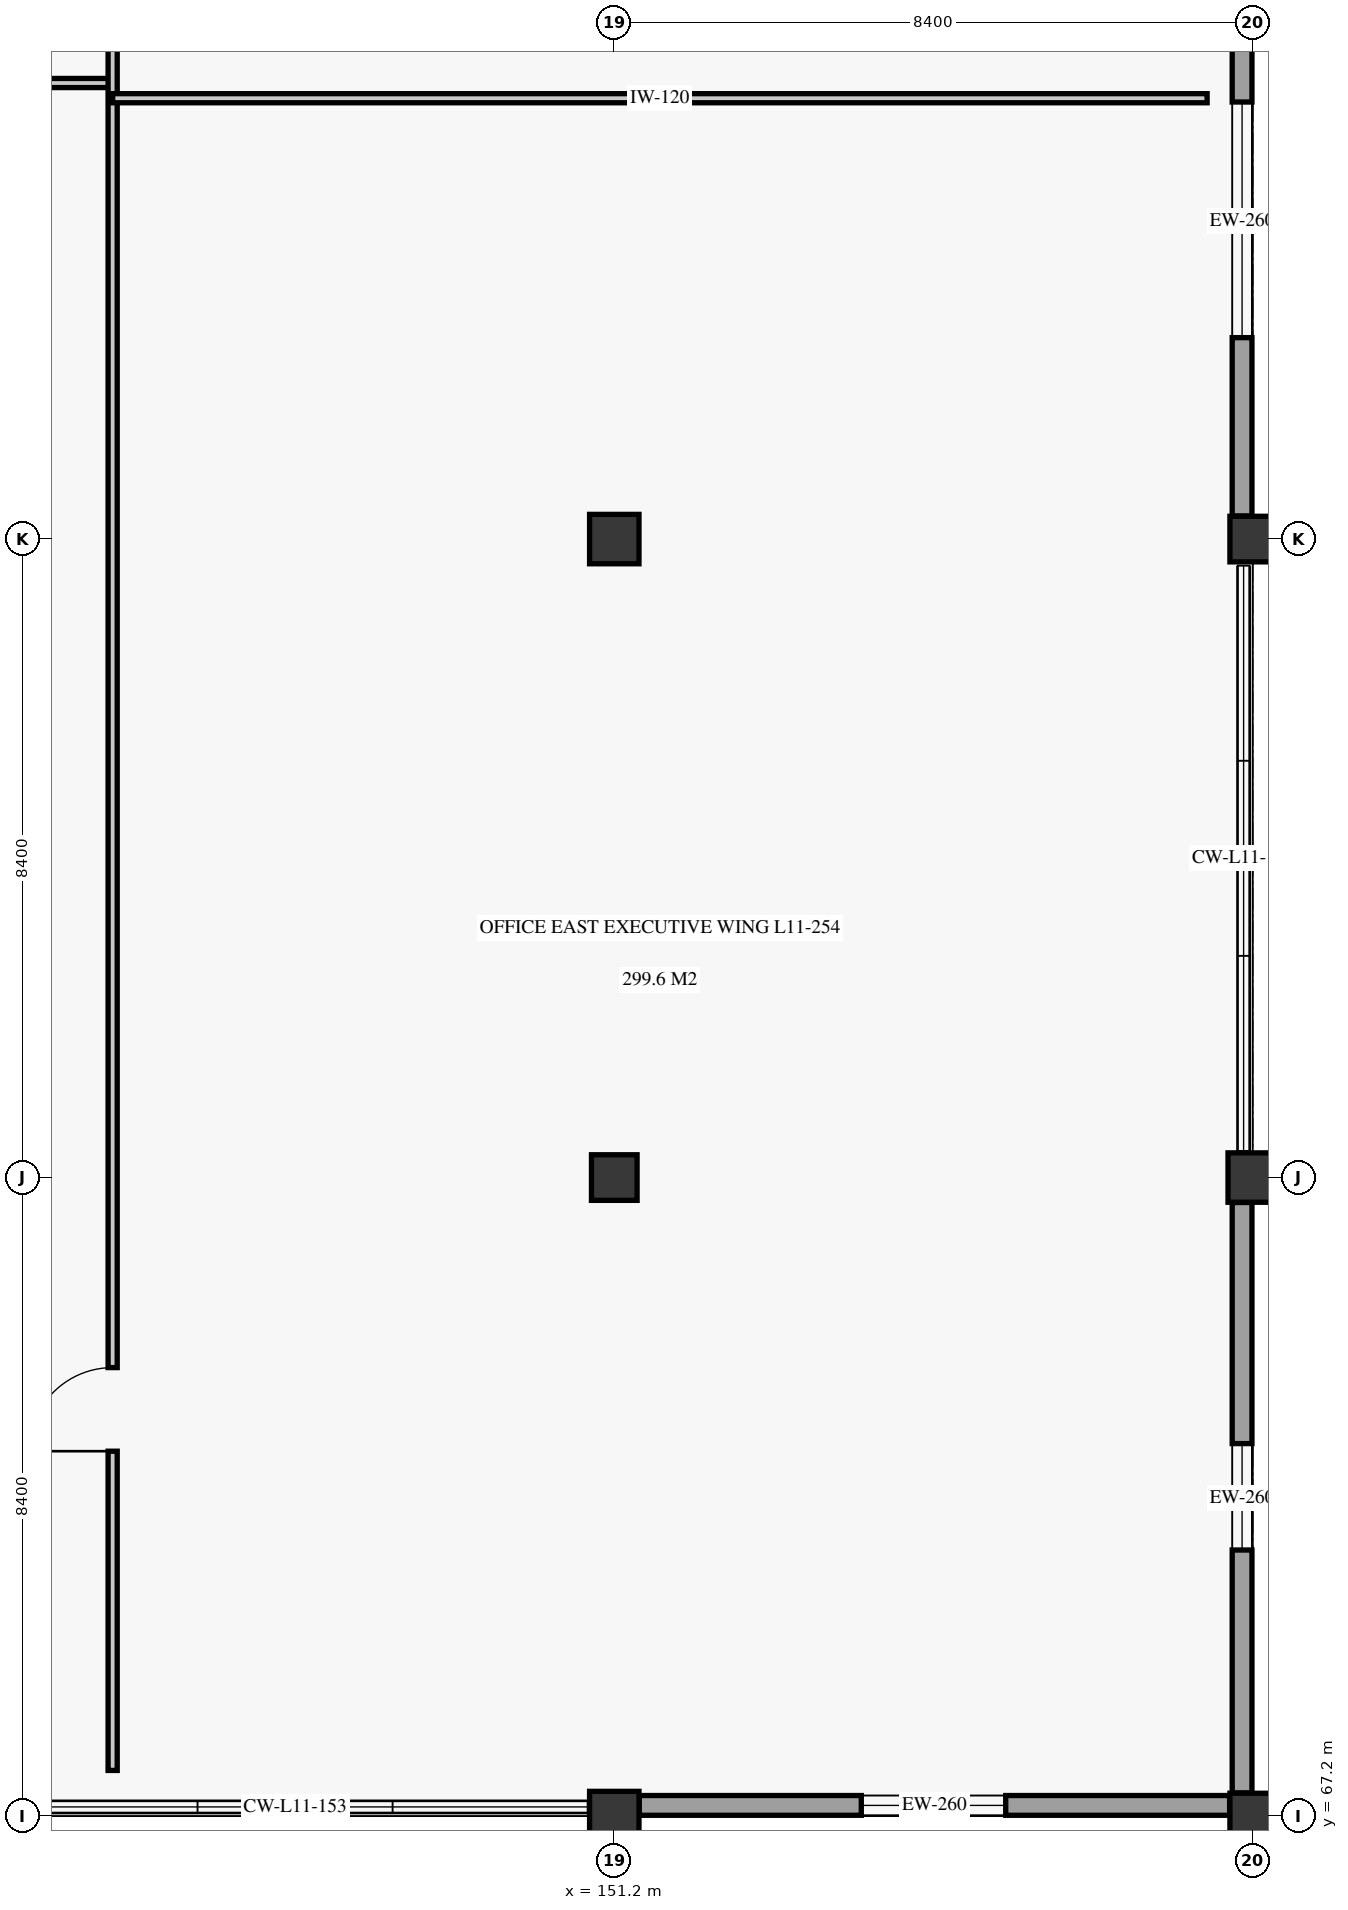
"""IFC4 building model, lengths in metres.
Left out: names, types, materials, properties, quantities, classifications, styles, units other than length and angle.
Written with IfcOpenShell. Run it as: python <this file> out.ifc"""

import sys

from ifc_helpers import new_model, si_unit, direction, frame, frame_2d, origin, origin_2d, place, context, subcontext, project, spatial, rectangle, extrude, element, fill, save


model = new_model("IFC4")
c1 = context("Model", 3, precision=1e-05, world=origin(), true_north=direction((0.0, 1.0)))
c2 = subcontext(c1, "Body", "Model", "MODEL_VIEW")
j1 = project(units=[si_unit("LENGTHUNIT", "METRE"), si_unit("PLANEANGLEUNIT", "RADIAN")], contexts=[c1])
p1 = place(None, origin())
s1 = spatial("IfcSite", under=j1, at=p1, CompositionType="ELEMENT")
p2 = place(p1, origin())
s2 = spatial("IfcBuilding", under=s1, at=p2, CompositionType="ELEMENT")
p3 = place(p2, frame((0.0, 0.0, 46.7)))
s3 = spatial("IfcBuildingStorey", under=s2, at=p3, CompositionType="ELEMENT", Elevation=46.7)
p4 = place(p3, frame((151.2, 67.2, 0.0), z_axis=(0.0, 0.0, 1.0), x_axis=(1.0, 0.0, 0.0)))
e1 = element("IfcColumn", 1, at=p4, inside=s3, PredefinedType="COLUMN", context=c2, shape_type="SweptSolid", body=[
    extrude(rectangle(XDim=0.65, YDim=0.65, at=origin_2d()), origin(), (0.0, 0.0, 1.0), 3.72),
])
p5 = place(p3, frame((151.2, 75.6, 0.0), z_axis=(0.0, 0.0, 1.0), x_axis=(1.0, 0.0, 0.0)))
e2 = element("IfcColumn", 2, at=p5, inside=s3, PredefinedType="COLUMN", context=c2, shape_type="SweptSolid", body=[
    extrude(rectangle(XDim=0.6, YDim=0.6, at=origin_2d()), origin(), (0.0, 0.0, 1.0), 3.72),
])
p6 = place(p3, frame((151.2, 84.0, 0.0), z_axis=(0.0, 0.0, 1.0), x_axis=(1.0, 0.0, 0.0)))
e3 = element("IfcColumn", 3, at=p6, inside=s3, PredefinedType="COLUMN", context=c2, shape_type="SweptSolid", body=[
    extrude(rectangle(XDim=0.65, YDim=0.65, at=origin_2d()), origin(), (0.0, 0.0, 1.0), 3.72),
])
p7 = place(p3, frame((159.6, 67.2, 0.0), z_axis=(0.0, 0.0, 1.0), x_axis=(1.0, 0.0, 0.0)))
e4 = element("IfcColumn", 4, at=p7, inside=s3, PredefinedType="COLUMN", context=c2, shape_type="SweptSolid", body=[
    extrude(rectangle(XDim=0.6, YDim=0.6, at=origin_2d()), origin(), (0.0, 0.0, 1.0), 3.72),
])
p8 = place(p3, frame((159.6, 75.6, 0.0), z_axis=(0.0, 0.0, 1.0), x_axis=(1.0, 0.0, 0.0)))
e5 = element("IfcColumn", 5, at=p8, inside=s3, PredefinedType="COLUMN", context=c2, shape_type="SweptSolid", body=[
    extrude(rectangle(XDim=0.65, YDim=0.65, at=origin_2d()), origin(), (0.0, 0.0, 1.0), 3.72),
])
p9 = place(p3, frame((159.6, 84.0, 0.0), z_axis=(0.0, 0.0, 1.0), x_axis=(1.0, 0.0, 0.0)))
e6 = element("IfcColumn", 6, at=p9, inside=s3, PredefinedType="COLUMN", context=c2, shape_type="SweptSolid", body=[
    extrude(rectangle(XDim=0.6, YDim=0.6, at=origin_2d()), origin(), (0.0, 0.0, 1.0), 3.72),
])
p10 = place(p3, frame((151.528, 67.34, 0.0), z_axis=(0.0, 0.0, 1.0), x_axis=(1.0, 0.0, 0.0)))
e7 = element("IfcWall", 7, at=p10, inside=s3, PredefinedType="SOLIDWALL", context=c2, shape_type="SweptSolid", body=[
    extrude(rectangle(XDim=7.768, YDim=0.26, at=frame_2d((3.884, 0.0))), origin(), (0.0, 0.0, 1.0), 3.04),
])
p11 = place(p10, frame((2.922, 0.0, 0.85)))
e8 = element("IfcOpeningElement", 8, at=p11, cuts=e7, PredefinedType="OPENING", context=c2, shape_type="SweptSolid", body=[
    extrude(rectangle(XDim=1.9, YDim=1.75, at=frame_2d((0.95, 0.875))), frame((0.0, 0.14, 0.0), z_axis=(0.0, -1.0, 0.0), x_axis=(1.0, 0.0, 0.0)), (0.0, 0.0, 1.0), 0.28),
])
p12 = place(p3, frame((159.46, 67.504, 0.0), z_axis=(0.0, 0.0, 1.0), x_axis=(0.0, 1.0, 0.0)))
e9 = element("IfcWall", 9, at=p12, inside=s3, PredefinedType="SOLIDWALL", context=c2, shape_type="SweptSolid", body=[
    extrude(rectangle(XDim=7.768, YDim=0.26, at=frame_2d((3.884, 0.0))), origin(), (0.0, 0.0, 1.0), 3.04),
])
p13 = place(p12, frame((3.196, 0.0, 0.85)))
e10 = element("IfcOpeningElement", 10, at=p13, cuts=e9, PredefinedType="OPENING", context=c2, shape_type="SweptSolid", body=[
    extrude(rectangle(XDim=1.4, YDim=1.7, at=frame_2d((0.7, 0.85))), frame((0.0, 0.14, 0.0), z_axis=(0.0, -1.0, 0.0), x_axis=(1.0, 0.0, 0.0)), (0.0, 0.0, 1.0), 0.28),
])
p14 = place(p3, frame((159.46, 84.304, 0.0), z_axis=(0.0, 0.0, 1.0), x_axis=(0.0, 1.0, 0.0)))
e11 = element("IfcWall", 11, at=p14, inside=s3, PredefinedType="SOLIDWALL", context=c2, shape_type="SweptSolid", body=[
    extrude(rectangle(XDim=7.768, YDim=0.26, at=frame_2d((3.884, 0.0))), origin(), (0.0, 0.0, 1.0), 3.04),
])
p15 = place(p14, frame((2.346, 0.0, 0.85)))
e12 = element("IfcOpeningElement", 12, at=p15, cuts=e11, PredefinedType="OPENING", context=c2, shape_type="SweptSolid", body=[
    extrude(rectangle(XDim=3.1, YDim=1.85, at=frame_2d((1.55, 0.925))), frame((0.0, 0.14, 0.0), z_axis=(0.0, -1.0, 0.0), x_axis=(1.0, 0.0, 0.0)), (0.0, 0.0, 1.0), 0.28),
])
p16 = place(p3, frame((118.2, 90.0, 0.0), z_axis=(0.0, 0.0, 1.0), x_axis=(1.0, 0.0, 0.0)))
e13 = element("IfcWall", 13, at=p16, inside=s3, PredefinedType="PARTITIONING", context=c2, shape_type="SweptSolid", body=[
    extrude(rectangle(XDim=26.4, YDim=0.12, at=frame_2d((13.2, 0.0))), origin(), (0.0, 0.0, 1.0), 3.34),
])
p17 = place(p16, frame((3.2, 0.0, 0.0)))
e14 = element("IfcOpeningElement", 14, at=p17, cuts=e13, PredefinedType="OPENING", context=c2, shape_type="SweptSolid", body=[
    extrude(rectangle(XDim=1.4, YDim=2.35, at=frame_2d((0.7, 1.175))), frame((0.0, 0.07, 0.0), z_axis=(0.0, -1.0, 0.0), x_axis=(1.0, 0.0, 0.0)), (0.0, 0.0, 1.0), 0.14),
])
p18 = place(p16, frame((21.0, 0.0, 0.0)))
e15 = element("IfcOpeningElement", 15, at=p18, cuts=e13, PredefinedType="OPENING", context=c2, shape_type="SweptSolid", body=[
    extrude(rectangle(XDim=1.4, YDim=2.35, at=frame_2d((0.7, 1.175))), frame((0.0, 0.07, 0.0), z_axis=(0.0, -1.0, 0.0), x_axis=(1.0, 0.0, 0.0)), (0.0, 0.0, 1.0), 0.14),
])
p19 = place(p3, frame((144.6, 67.8, 0.0), z_axis=(0.0, 0.0, 1.0), x_axis=(0.0, 1.0, 0.0)))
e16 = element("IfcWall", 16, at=p19, inside=s3, PredefinedType="PARTITIONING", context=c2, shape_type="SweptSolid", body=[
    extrude(rectangle(XDim=32.4, YDim=0.12, at=frame_2d((16.2, 0.0))), origin(), (0.0, 0.0, 1.0), 3.34),
])
p20 = place(p19, frame((4.2, 0.0, 0.0)))
e17 = element("IfcOpeningElement", 17, at=p20, cuts=e16, PredefinedType="OPENING", context=c2, shape_type="SweptSolid", body=[
    extrude(rectangle(XDim=1.1, YDim=2.15, at=frame_2d((0.55, 1.075))), frame((0.0, 0.07, 0.0), z_axis=(0.0, -1.0, 0.0), x_axis=(1.0, 0.0, 0.0)), (0.0, 0.0, 1.0), 0.14),
])
p21 = place(p19, frame((26.4, 0.0, 0.0)))
e18 = element("IfcOpeningElement", 18, at=p21, cuts=e16, PredefinedType="OPENING", context=c2, shape_type="SweptSolid", body=[
    extrude(rectangle(XDim=1.2, YDim=2.3, at=frame_2d((0.6, 1.15))), frame((0.0, 0.07, 0.0), z_axis=(0.0, -1.0, 0.0), x_axis=(1.0, 0.0, 0.0)), (0.0, 0.0, 1.0), 0.14),
])
p22 = place(p3, frame((144.6, 89.8, 0.0), z_axis=(0.0, 0.0, 1.0), x_axis=(1.0, 0.0, 0.0)))
e19 = element("IfcWall", 19, at=p22, inside=s3, PredefinedType="PARTITIONING", context=c2, shape_type="SweptSolid", body=[
    extrude(rectangle(XDim=14.4, YDim=0.12, at=frame_2d((7.2, 0.0))), origin(), (0.0, 0.0, 1.0), 3.34),
])
p23 = place(p11, origin())
e20 = element("IfcWindow", 20, at=p23, inside=s3, PartitioningType="SINGLE_PANEL", PredefinedType="WINDOW", context=c2, shape_type="SweptSolid", body=[
    extrude(rectangle(XDim=1.9, YDim=1.75, at=frame_2d((0.95, 0.875))), frame((0.0, 0.03, 0.0), z_axis=(0.0, -1.0, 0.0), x_axis=(1.0, 0.0, 0.0)), (0.0, 0.0, 1.0), 0.06),
])
fill(e8, e20)
p24 = place(p13, origin())
e21 = element("IfcWindow", 21, at=p24, inside=s3, PartitioningType="SINGLE_PANEL", PredefinedType="WINDOW", context=c2, shape_type="SweptSolid", body=[
    extrude(rectangle(XDim=1.4, YDim=1.7, at=frame_2d((0.7, 0.85))), frame((0.0, 0.03, 0.0), z_axis=(0.0, -1.0, 0.0), x_axis=(1.0, 0.0, 0.0)), (0.0, 0.0, 1.0), 0.06),
])
fill(e10, e21)
p25 = place(p15, origin())
e22 = element("IfcWindow", 22, at=p25, inside=s3, PartitioningType="SINGLE_PANEL", PredefinedType="WINDOW", context=c2, shape_type="SweptSolid", body=[
    extrude(rectangle(XDim=3.1, YDim=1.85, at=frame_2d((1.55, 0.925))), frame((0.0, 0.03, 0.0), z_axis=(0.0, -1.0, 0.0), x_axis=(1.0, 0.0, 0.0)), (0.0, 0.0, 1.0), 0.06),
])
fill(e12, e22)
p26 = place(p20, origin())
e23 = element("IfcDoor", 23, at=p26, inside=s3, OperationType="SINGLE_SWING_LEFT", PredefinedType="DOOR", context=c2, shape_type="SweptSolid", body=[
    extrude(rectangle(XDim=1.1, YDim=2.15, at=frame_2d((0.55, 1.075))), frame((0.0, 0.025, 0.0), z_axis=(0.0, -1.0, 0.0), x_axis=(1.0, 0.0, 0.0)), (0.0, 0.0, 1.0), 0.05),
])
fill(e17, e23)
save(model, sys.argv[1])
